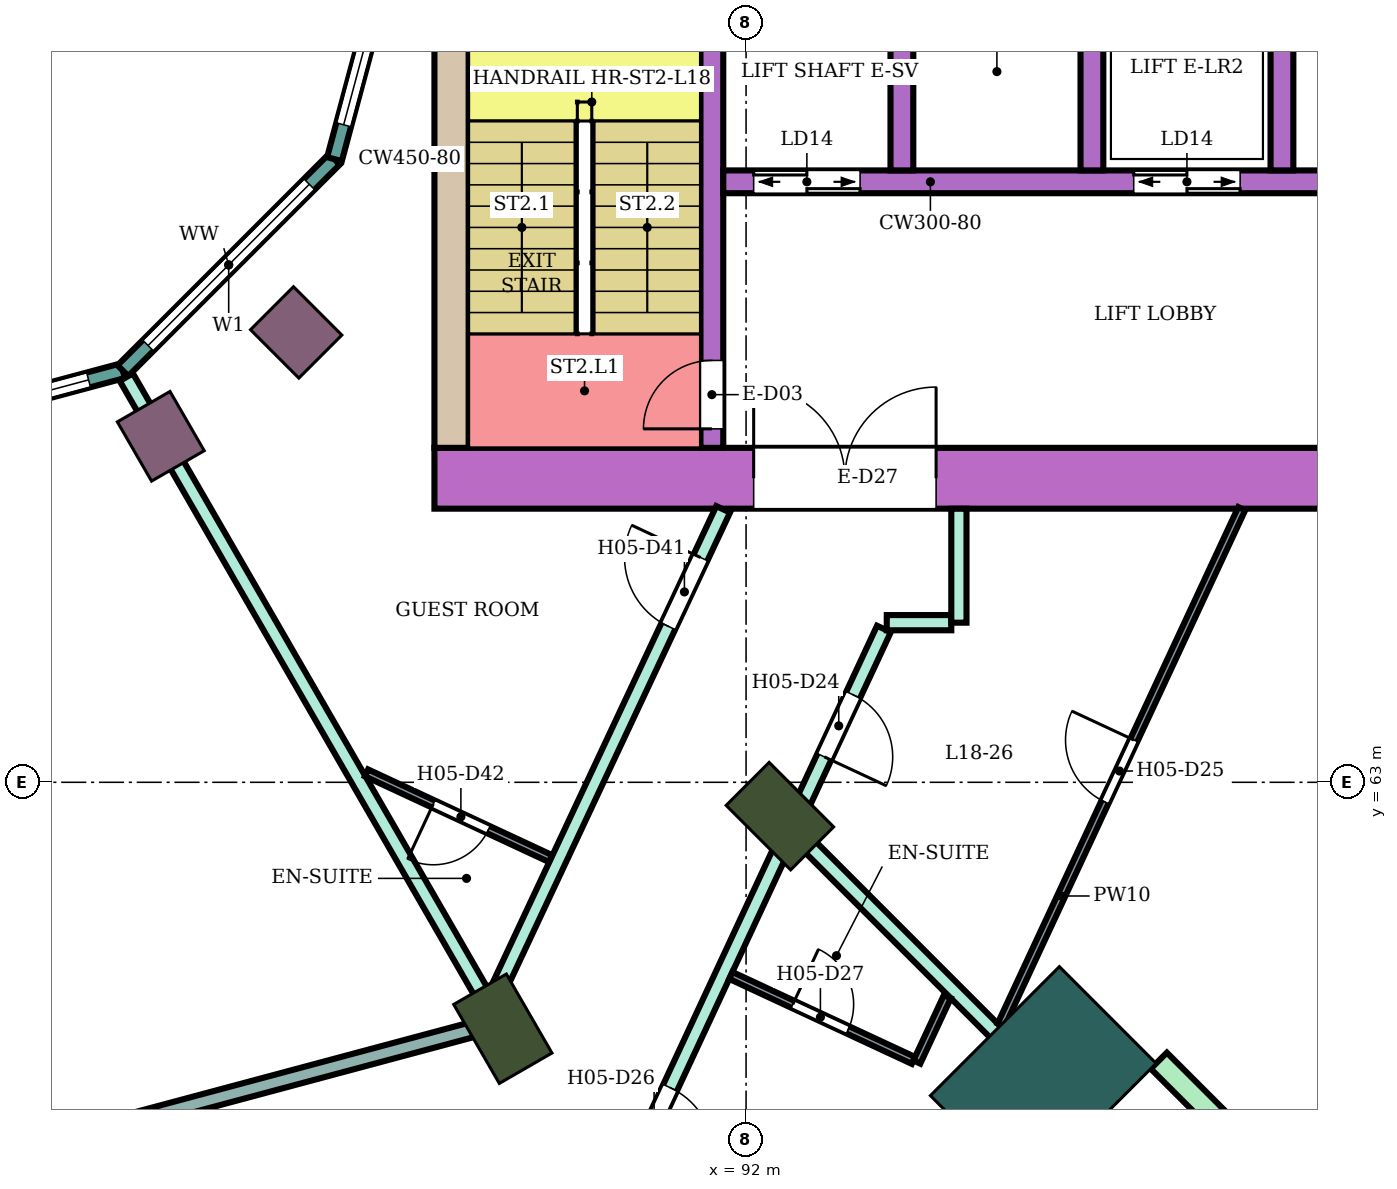
"""IFC4 building model, lengths in metres.
Left out: names, types, materials, properties, quantities, classifications, styles, units other than length and angle.
Written with IfcOpenShell. Run it as: python <this file> out.ifc"""

import sys

from ifc_helpers import new_model, si_unit, direction, frame, frame_2d, origin, origin_2d, place, context, subcontext, project, spatial, rectangle, extrude, element, fill, save


model = new_model("IFC4")
c1 = context("Model", 3, precision=1e-05, world=origin(), true_north=direction((0.0, 1.0)))
c2 = subcontext(c1, "Body", "Model", "MODEL_VIEW")
j1 = project(units=[si_unit("LENGTHUNIT", "METRE"), si_unit("PLANEANGLEUNIT", "RADIAN")], contexts=[c1])
p1 = place(None, origin())
s1 = spatial("IfcSite", under=j1, at=p1, CompositionType="ELEMENT")
p2 = place(p1, origin())
s2 = spatial("IfcBuilding", under=s1, at=p2, CompositionType="ELEMENT")
p3 = place(p2, frame((0.0, 0.0, 82.4)))
s3 = spatial("IfcBuildingStorey", under=s2, at=p3, CompositionType="ELEMENT", Elevation=82.4)
for number, where, z_axis, x_axis in (
    (1, (88.8, 59.758, 0.0), (0.0, 0.0, 1.0), (0.5, -0.866, 0.0)),
    (2, (92.445, 62.555, 0.0), (0.0, 0.0, 1.0), (0.707, -0.707, 0.0)),
):
    element("IfcColumn", number, at=place(p3, frame(where, z_axis=z_axis, x_axis=x_axis)), inside=s3, PredefinedType="COLUMN", context=c2, shape_type="SweptSolid", body=[
        extrude(rectangle(XDim=1.2, YDim=0.8, at=origin_2d()), origin(), (0.0, 0.0, 1.0), 3.8),
    ])
for number, where, z_axis, x_axis in (
    (3, (84.3, 67.552, 0.0), (0.0, 0.0, 1.0), (0.5, -0.866, 0.0)),
    (4, (86.081, 68.919, 0.0), (0.0, 0.0, 1.0), (0.707, -0.707, 0.0)),
):
    element("IfcColumn", number, at=place(p3, frame(where, z_axis=z_axis, x_axis=x_axis)), inside=s3, PredefinedType="COLUMN", context=c2, shape_type="SweptSolid", body=[
        extrude(rectangle(XDim=0.9, YDim=0.8, at=origin_2d()), origin(), (0.0, 0.0, 1.0), 3.8),
    ])
p4 = place(p3, frame((95.91, 59.09, 0.0), z_axis=(0.0, 0.0, 1.0), x_axis=(0.707106781187, -0.707106781187, 0.0)))
e5 = element("IfcColumn", 5, at=p4, inside=s3, PredefinedType="COLUMN", context=c2, shape_type="SweptSolid", body=[
    extrude(rectangle(XDim=1.8, YDim=2.4, at=origin_2d()), origin(), (0.0, 0.0, 1.0), 3.8),
])
p5 = place(p3, frame((87.9, 67.0, 0.0), z_axis=(0.0, 0.0, 1.0), x_axis=(1.0, 0.0, 0.0)))
e6 = element("IfcWall", 6, at=p5, inside=s3, PredefinedType="SHEAR", context=c2, shape_type="SweptSolid", body=[
    extrude(rectangle(XDim=14.7, YDim=0.8, at=frame_2d((7.35, 0.0))), origin(), (0.0, 0.0, 1.0), 3.48),
])
p6 = place(p5, frame((4.2, 0.0, 0.0)))
e7 = element("IfcOpeningElement", 7, at=p6, cuts=e6, PredefinedType="OPENING", context=c2, shape_type="SweptSolid", body=[
    extrude(rectangle(XDim=2.4, YDim=2.4, at=frame_2d((1.2, 1.2))), frame((0.0, 0.41, 0.0), z_axis=(0.0, -1.0, 0.0), x_axis=(1.0, 0.0, 0.0)), (0.0, 0.0, 1.0), 0.82),
])
p7 = place(p3, frame((88.125, 67.4, 0.0), z_axis=(0.0, 0.0, 1.0), x_axis=(0.0, 1.0, 0.0)))
e8 = element("IfcWall", 8, at=p7, inside=s3, PredefinedType="SHEAR", context=c2, shape_type="SweptSolid", body=[
    extrude(rectangle(XDim=7.6, YDim=0.45, at=frame_2d((3.8, 0.0))), origin(), (0.0, 0.0, 1.0), 3.48),
])
p8 = place(p3, frame((91.55, 67.4, 0.0), z_axis=(0.0, 0.0, 1.0), x_axis=(0.0, 1.0, 0.0)))
e9 = element("IfcWall", 9, at=p8, inside=s3, PredefinedType="SHEAR", context=c2, shape_type="SweptSolid", body=[
    extrude(rectangle(XDim=7.6, YDim=0.3, at=frame_2d((3.8, 0.0))), origin(), (0.0, 0.0, 1.0), 3.48),
])
p9 = place(p8, frame((0.25, 0.0, 0.0)))
e10 = element("IfcOpeningElement", 10, at=p9, cuts=e9, PredefinedType="OPENING", context=c2, shape_type="SweptSolid", body=[
    extrude(rectangle(XDim=0.9, YDim=2.1, at=frame_2d((0.45, 1.05))), frame((0.0, 0.16, 0.0), z_axis=(0.0, -1.0, 0.0), x_axis=(1.0, 0.0, 0.0)), (0.0, 0.0, 1.0), 0.32),
])
p10 = place(p3, frame((91.7, 70.9, 0.0), z_axis=(0.0, 0.0, 1.0), x_axis=(1.0, 0.0, 0.0)))
e11 = element("IfcWall", 11, at=p10, inside=s3, PredefinedType="SHEAR", context=c2, shape_type="SweptSolid", body=[
    extrude(rectangle(XDim=10.9, YDim=0.3, at=frame_2d((5.45, 0.0))), origin(), (0.0, 0.0, 1.0), 3.48),
])
p11 = place(p10, frame((0.4, 0.0, 0.0)))
e12 = element("IfcOpeningElement", 12, at=p11, cuts=e11, PredefinedType="OPENING", context=c2, shape_type="SweptSolid", body=[
    extrude(rectangle(XDim=1.4, YDim=2.1, at=frame_2d((0.7, 1.05))), frame((0.0, 0.16, 0.0), z_axis=(0.0, -1.0, 0.0), x_axis=(1.0, 0.0, 0.0)), (0.0, 0.0, 1.0), 0.32),
])
p12 = place(p10, frame((5.4, 0.0, 0.0)))
e13 = element("IfcOpeningElement", 13, at=p12, cuts=e11, PredefinedType="OPENING", context=c2, shape_type="SweptSolid", body=[
    extrude(rectangle(XDim=1.4, YDim=2.1, at=frame_2d((0.7, 1.05))), frame((0.0, 0.16, 0.0), z_axis=(0.0, -1.0, 0.0), x_axis=(1.0, 0.0, 0.0)), (0.0, 0.0, 1.0), 0.32),
])
p13 = place(p10, frame((8.1, 0.0, 0.0)))
e14 = element("IfcOpeningElement", 14, at=p13, cuts=e11, PredefinedType="OPENING", context=c2, shape_type="SweptSolid", body=[
    extrude(rectangle(XDim=1.0, YDim=2.1, at=frame_2d((0.5, 1.05))), frame((0.0, 0.16, 0.0), z_axis=(0.0, -1.0, 0.0), x_axis=(1.0, 0.0, 0.0)), (0.0, 0.0, 1.0), 0.32),
])
for number, where, z_axis, x_axis in (
    (15, (94.05, 71.05, 0.0), (0.0, 0.0, 1.0), (0.0, 1.0, 0.0)),
    (16, (96.55, 71.05, 0.0), (0.0, 0.0, 1.0), (0.0, 1.0, 0.0)),
    (17, (99.05, 71.05, 0.0), (0.0, 0.0, 1.0), (0.0, 1.0, 0.0)),
):
    element("IfcWall", number, at=place(p3, frame(where, z_axis=z_axis, x_axis=x_axis)), inside=s3, PredefinedType="SHEAR", context=c2, shape_type="SweptSolid", body=[
        extrude(rectangle(XDim=2.55, YDim=0.3, at=frame_2d((1.275, 0.0))), origin(), (0.0, 0.0, 1.0), 3.48),
    ])
p14 = place(p3, frame((97.43, 59.338, 0.0), z_axis=(0.0, 0.0, 1.0), x_axis=(0.707106781187, -0.707106781187, 0.0)))
e18 = element("IfcWall", 18, at=p14, inside=s3, PredefinedType="NOTDEFINED", context=c2, shape_type="SweptSolid", body=[
    extrude(rectangle(XDim=2.416, YDim=0.3, at=frame_2d((1.208, 0.0))), origin(), (0.0, 0.0, 1.0), 3.8),
])
p15 = place(p3, frame((80.0, 67.396, 0.0), z_axis=(0.0, 0.0, 1.0), x_axis=(0.965933654434, 0.258789828301, 0.0)))
e19 = element("IfcWall", 19, at=p15, inside=s3, PredefinedType="NOTDEFINED", context=c2, shape_type="SweptSolid", body=[
    extrude(rectangle(XDim=3.936, YDim=0.2, at=frame_2d((1.968, 0.0))), origin(), (0.0, 0.0, 1.0), 3.8),
])
p16 = place(p15, frame((0.468, 0.0, 0.9)))
e20 = element("IfcOpeningElement", 20, at=p16, cuts=e19, PredefinedType="OPENING", context=c2, shape_type="SweptSolid", body=[
    extrude(rectangle(XDim=3.0, YDim=2.3, at=frame_2d((1.5, 1.15))), frame((0.0, 0.11, 0.0), z_axis=(0.0, -1.0, 0.0), x_axis=(1.0, 0.0, 0.0)), (0.0, 0.0, 1.0), 0.22),
])
p17 = place(p3, frame((83.802, 68.415, 0.0), z_axis=(0.0, 0.0, 1.0), x_axis=(0.707106781187, 0.707106781187, 0.0)))
e21 = element("IfcWall", 21, at=p17, inside=s3, PredefinedType="NOTDEFINED", context=c2, shape_type="SweptSolid", body=[
    extrude(rectangle(XDim=3.936, YDim=0.2, at=frame_2d((1.968, 0.0))), origin(), (0.0, 0.0, 1.0), 3.8),
])
p18 = place(p17, frame((0.468, 0.0, 0.9)))
e22 = element("IfcOpeningElement", 22, at=p18, cuts=e21, PredefinedType="OPENING", context=c2, shape_type="SweptSolid", body=[
    extrude(rectangle(XDim=3.0, YDim=2.3, at=frame_2d((1.5, 1.15))), frame((0.0, 0.11, 0.0), z_axis=(0.0, -1.0, 0.0), x_axis=(1.0, 0.0, 0.0)), (0.0, 0.0, 1.0), 0.22),
])
p19 = place(p3, frame((86.585, 71.198, 0.0), z_axis=(0.0, 0.0, 1.0), x_axis=(0.258789828301, 0.965933654434, 0.0)))
e23 = element("IfcWall", 23, at=p19, inside=s3, PredefinedType="NOTDEFINED", context=c2, shape_type="SweptSolid", body=[
    extrude(rectangle(XDim=3.936, YDim=0.2, at=frame_2d((1.968, 0.0))), origin(), (0.0, 0.0, 1.0), 3.8),
])
p20 = place(p19, frame((0.468, 0.0, 0.9)))
e24 = element("IfcOpeningElement", 24, at=p20, cuts=e23, PredefinedType="OPENING", context=c2, shape_type="SweptSolid", body=[
    extrude(rectangle(XDim=3.0, YDim=2.3, at=frame_2d((1.5, 1.15))), frame((0.0, 0.11, 0.0), z_axis=(0.0, -1.0, 0.0), x_axis=(1.0, 0.0, 0.0)), (0.0, 0.0, 1.0), 0.22),
])
p21 = place(p3, frame((80.0, 57.496, 0.0), z_axis=(0.0, 0.0, 1.0), x_axis=(0.96592471314, 0.258823199396, 0.0)))
e25 = element("IfcWall", 25, at=p21, inside=s3, PredefinedType="PARTITIONING", context=c2, shape_type="SweptSolid", body=[
    extrude(rectangle(XDim=8.732, YDim=0.2, at=frame_2d((4.366, 0.0))), origin(), (0.0, 0.0, 1.0), 2.98),
])
p22 = place(p3, frame((83.846, 68.33, 0.0), z_axis=(0.0, 0.0, 1.0), x_axis=(0.499822319857, -0.866127963163, 0.0)))
e26 = element("IfcWall", 26, at=p22, inside=s3, PredefinedType="PARTITIONING", context=c2, shape_type="SweptSolid", body=[
    extrude(rectangle(XDim=9.382, YDim=0.2, at=frame_2d((4.691, 0.0))), origin(), (0.0, 0.0, 1.0), 3.35),
])
p23 = place(p3, frame((88.501, 59.775, 0.0), z_axis=(0.0, 0.0, 1.0), x_axis=(0.424700525505, 0.905333896215, 0.0)))
e27 = element("IfcWall", 27, at=p23, inside=s3, PredefinedType="PARTITIONING", context=c2, shape_type="SweptSolid", body=[
    extrude(rectangle(XDim=7.53, YDim=0.2, at=frame_2d((3.765, 0.0))), origin(), (0.0, 0.0, 1.0), 3.35),
])
p24 = place(p23, frame((5.83, 0.0, 0.0)))
e28 = element("IfcOpeningElement", 28, at=p24, cuts=e27, PredefinedType="OPENING", context=c2, shape_type="SweptSolid", body=[
    extrude(rectangle(XDim=1.0, YDim=2.1, at=frame_2d((0.5, 1.05))), frame((0.0, 0.11, 0.0), z_axis=(0.0, -1.0, 0.0), x_axis=(1.0, 0.0, 0.0)), (0.0, 0.0, 1.0), 0.22),
])
p25 = place(p3, frame((90.346, 57.578, 0.0), z_axis=(0.0, 0.0, 1.0), x_axis=(0.422403412327, 0.906407941964, 0.0)))
e29 = element("IfcWall", 29, at=p25, inside=s3, PredefinedType="PARTITIONING", context=c2, shape_type="SweptSolid", body=[
    extrude(rectangle(XDim=8.208, YDim=0.2, at=frame_2d((4.104, 0.0))), origin(), (0.0, 0.0, 1.0), 3.35),
])
p26 = place(p25, frame((6.351, 0.0, 0.0)))
e30 = element("IfcOpeningElement", 30, at=p26, cuts=e29, PredefinedType="OPENING", context=c2, shape_type="SweptSolid", body=[
    extrude(rectangle(XDim=0.9, YDim=2.1, at=frame_2d((0.45, 1.05))), frame((0.0, 0.11, 0.0), z_axis=(0.0, -1.0, 0.0), x_axis=(1.0, 0.0, 0.0)), (0.0, 0.0, 1.0), 0.22),
])
p27 = place(p25, frame((0.55, 0.0, 0.0)))
e31 = element("IfcOpeningElement", 31, at=p27, cuts=e29, PredefinedType="OPENING", context=c2, shape_type="SweptSolid", body=[
    extrude(rectangle(XDim=1.0, YDim=2.1, at=frame_2d((0.5, 1.05))), frame((0.0, 0.11, 0.0), z_axis=(0.0, -1.0, 0.0), x_axis=(1.0, 0.0, 0.0)), (0.0, 0.0, 1.0), 0.22),
])
p28 = place(p3, frame((92.692, 62.303, 0.0), z_axis=(0.0, 0.0, 1.0), x_axis=(0.706920663731, -0.707292849667, 0.0)))
e32 = element("IfcWall", 32, at=p28, inside=s3, PredefinedType="PARTITIONING", context=c2, shape_type="SweptSolid", body=[
    extrude(rectangle(XDim=5.248, YDim=0.2, at=frame_2d((2.624, 0.0))), origin(), (0.0, 0.0, 1.0), 3.35),
])
p29 = place(p3, frame((93.851, 65.1, 0.0), z_axis=(0.0, 0.0, 1.0), x_axis=(1.0, 0.0, 0.0)))
e33 = element("IfcWall", 33, at=p29, inside=s3, PredefinedType="PARTITIONING", context=c2, shape_type="SweptSolid", body=[
    extrude(rectangle(XDim=0.849, YDim=0.2, at=frame_2d((0.424, 0.0))), origin(), (0.0, 0.0, 1.0), 3.35),
])
p30 = place(p3, frame((94.8, 65.1, 0.0), z_axis=(0.0, 0.0, 1.0), x_axis=(0.0, 1.0, 0.0)))
e34 = element("IfcWall", 34, at=p30, inside=s3, PredefinedType="PARTITIONING", context=c2, shape_type="SweptSolid", body=[
    extrude(rectangle(XDim=1.499, YDim=0.2, at=frame_2d((0.75, 0.0))), origin(), (0.0, 0.0, 1.0), 3.35),
])
p31 = place(p3, frame((87.006, 63.124, 0.0), z_axis=(0.0, 0.0, 1.0), x_axis=(0.906535604863, -0.422129360642, 0.0)))
e35 = element("IfcWall", 35, at=p31, inside=s3, PredefinedType="PARTITIONING", context=c2, shape_type="SweptSolid", body=[
    extrude(rectangle(XDim=2.67, YDim=0.1, at=frame_2d((1.335, 0.0))), origin(), (0.0, 0.0, 1.0), 3.35),
])
p32 = place(p31, frame((0.97, 0.0, 0.0)))
e36 = element("IfcOpeningElement", 36, at=p32, cuts=e35, PredefinedType="OPENING", context=c2, shape_type="SweptSolid", body=[
    extrude(rectangle(XDim=0.8, YDim=2.1, at=frame_2d((0.4, 1.05))), frame((0.0, 0.06, 0.0), z_axis=(0.0, -1.0, 0.0), x_axis=(1.0, 0.0, 0.0)), (0.0, 0.0, 1.0), 0.12),
])
p33 = place(p3, frame((91.8, 60.459, 0.0), z_axis=(0.0, 0.0, 1.0), x_axis=(0.906644059932, -0.421896371861, 0.0)))
e37 = element("IfcWall", 37, at=p33, inside=s3, PredefinedType="PARTITIONING", context=c2, shape_type="SweptSolid", body=[
    extrude(rectangle(XDim=2.649, YDim=0.1, at=frame_2d((1.325, 0.0))), origin(), (0.0, 0.0, 1.0), 3.35),
])
p34 = place(p33, frame((0.899, 0.0, 0.0)))
e38 = element("IfcOpeningElement", 38, at=p34, cuts=e37, PredefinedType="OPENING", context=c2, shape_type="SweptSolid", body=[
    extrude(rectangle(XDim=0.8, YDim=2.1, at=frame_2d((0.4, 1.05))), frame((0.0, 0.06, 0.0), z_axis=(0.0, -1.0, 0.0), x_axis=(1.0, 0.0, 0.0)), (0.0, 0.0, 1.0), 0.12),
])
p35 = place(p3, frame((94.247, 59.32, 0.0), z_axis=(0.0, 0.0, 1.0), x_axis=(0.422660124657, 0.906288264861, 0.0)))
e39 = element("IfcWall", 39, at=p35, inside=s3, PredefinedType="PARTITIONING", context=c2, shape_type="SweptSolid", body=[
    extrude(rectangle(XDim=0.949, YDim=0.1, at=frame_2d((0.475, 0.0))), origin(), (0.0, 0.0, 1.0), 3.35),
])
p36 = place(p3, frame((95.355, 59.806, 0.0), z_axis=(0.0, 0.0, 1.0), x_axis=(0.422407546544, 0.906406015328, 0.0)))
e40 = element("IfcWall", 40, at=p36, inside=s3, PredefinedType="PARTITIONING", context=c2, shape_type="SweptSolid", body=[
    extrude(rectangle(XDim=7.496, YDim=0.1, at=frame_2d((3.748, 0.0))), origin(), (0.0, 0.0, 1.0), 3.35),
])
p37 = place(p36, frame((3.238, 0.0, 0.0)))
e41 = element("IfcOpeningElement", 41, at=p37, cuts=e40, PredefinedType="OPENING", context=c2, shape_type="SweptSolid", body=[
    extrude(rectangle(XDim=0.9, YDim=2.1, at=frame_2d((0.45, 1.05))), frame((0.0, 0.06, 0.0), z_axis=(0.0, -1.0, 0.0), x_axis=(1.0, 0.0, 0.0)), (0.0, 0.0, 1.0), 0.12),
])
p38 = place(p16, origin())
e42 = element("IfcWindow", 42, at=p38, inside=s3, PartitioningType="SINGLE_PANEL", PredefinedType="WINDOW", context=c2, shape_type="SweptSolid", body=[
    extrude(rectangle(XDim=3.0, YDim=2.3, at=frame_2d((1.5, 1.15))), frame((0.0, 0.03, 0.0), z_axis=(0.0, -1.0, 0.0), x_axis=(1.0, 0.0, 0.0)), (0.0, 0.0, 1.0), 0.06),
])
fill(e20, e42)
p39 = place(p18, origin())
e43 = element("IfcWindow", 43, at=p39, inside=s3, PartitioningType="SINGLE_PANEL", PredefinedType="WINDOW", context=c2, shape_type="SweptSolid", body=[
    extrude(rectangle(XDim=3.0, YDim=2.3, at=frame_2d((1.5, 1.15))), frame((0.0, 0.03, 0.0), z_axis=(0.0, -1.0, 0.0), x_axis=(1.0, 0.0, 0.0)), (0.0, 0.0, 1.0), 0.06),
])
fill(e22, e43)
p40 = place(p20, origin())
e44 = element("IfcWindow", 44, at=p40, inside=s3, PartitioningType="SINGLE_PANEL", PredefinedType="WINDOW", context=c2, shape_type="SweptSolid", body=[
    extrude(rectangle(XDim=3.0, YDim=2.3, at=frame_2d((1.5, 1.15))), frame((0.0, 0.03, 0.0), z_axis=(0.0, -1.0, 0.0), x_axis=(1.0, 0.0, 0.0)), (0.0, 0.0, 1.0), 0.06),
])
fill(e24, e44)
p41 = place(p26, frame((0.9, 0.0, 0.0), z_axis=(0.0, 0.0, 1.0), x_axis=(-1.0, 0.0, 0.0)))
e45 = element("IfcDoor", 45, at=p41, inside=s3, OperationType="SINGLE_SWING_RIGHT", PredefinedType="DOOR", context=c2, shape_type="SweptSolid", body=[
    extrude(rectangle(XDim=0.9, YDim=2.1, at=frame_2d((0.45, 1.05))), frame((0.0, 0.025, 0.0), z_axis=(0.0, -1.0, 0.0), x_axis=(1.0, 0.0, 0.0)), (0.0, 0.0, 1.0), 0.05),
])
fill(e30, e45)
p42 = place(p37, origin())
e46 = element("IfcDoor", 46, at=p42, inside=s3, OperationType="SINGLE_SWING_RIGHT", PredefinedType="DOOR", context=c2, shape_type="SweptSolid", body=[
    extrude(rectangle(XDim=0.9, YDim=2.1, at=frame_2d((0.45, 1.05))), frame((0.0, 0.025, 0.0), z_axis=(0.0, -1.0, 0.0), x_axis=(1.0, 0.0, 0.0)), (0.0, 0.0, 1.0), 0.05),
])
fill(e41, e46)
p43 = place(p27, frame((1.0, 0.0, 0.0), z_axis=(0.0, 0.0, 1.0), x_axis=(-1.0, 0.0, 0.0)))
e47 = element("IfcDoor", 47, at=p43, inside=s3, OperationType="SINGLE_SWING_RIGHT", PredefinedType="DOOR", context=c2, shape_type="SweptSolid", body=[
    extrude(rectangle(XDim=1.0, YDim=2.1, at=frame_2d((0.5, 1.05))), frame((0.0, 0.025, 0.0), z_axis=(0.0, -1.0, 0.0), x_axis=(1.0, 0.0, 0.0)), (0.0, 0.0, 1.0), 0.05),
])
fill(e31, e47)
p44 = place(p34, origin())
e48 = element("IfcDoor", 48, at=p44, inside=s3, OperationType="SINGLE_SWING_LEFT", PredefinedType="DOOR", context=c2, shape_type="SweptSolid", body=[
    extrude(rectangle(XDim=0.8, YDim=2.1, at=frame_2d((0.4, 1.05))), frame((0.0, 0.025, 0.0), z_axis=(0.0, -1.0, 0.0), x_axis=(1.0, 0.0, 0.0)), (0.0, 0.0, 1.0), 0.05),
])
fill(e38, e48)
p45 = place(p24, origin())
e49 = element("IfcDoor", 49, at=p45, inside=s3, OperationType="SINGLE_SWING_RIGHT", PredefinedType="DOOR", context=c2, shape_type="SweptSolid", body=[
    extrude(rectangle(XDim=1.0, YDim=2.1, at=frame_2d((0.5, 1.05))), frame((0.0, 0.025, 0.0), z_axis=(0.0, -1.0, 0.0), x_axis=(1.0, 0.0, 0.0)), (0.0, 0.0, 1.0), 0.05),
])
fill(e28, e49)
p46 = place(p32, frame((0.8, 0.0, 0.0), z_axis=(0.0, 0.0, 1.0), x_axis=(-1.0, 0.0, 0.0)))
e50 = element("IfcDoor", 50, at=p46, inside=s3, OperationType="SINGLE_SWING_RIGHT", PredefinedType="DOOR", context=c2, shape_type="SweptSolid", body=[
    extrude(rectangle(XDim=0.8, YDim=2.1, at=frame_2d((0.4, 1.05))), frame((0.0, 0.025, 0.0), z_axis=(0.0, -1.0, 0.0), x_axis=(1.0, 0.0, 0.0)), (0.0, 0.0, 1.0), 0.05),
])
fill(e36, e50)
p47 = place(p9, origin())
e51 = element("IfcDoor", 51, at=p47, inside=s3, OperationType="SINGLE_SWING_LEFT", PredefinedType="DOOR", context=c2, shape_type="SweptSolid", body=[
    extrude(rectangle(XDim=0.9, YDim=2.1, at=frame_2d((0.45, 1.05))), frame((0.0, 0.025, 0.0), z_axis=(0.0, -1.0, 0.0), x_axis=(1.0, 0.0, 0.0)), (0.0, 0.0, 1.0), 0.05),
])
fill(e10, e51)
p48 = place(p11, origin())
e52 = element("IfcDoor", 52, at=p48, inside=s3, OperationType="DOUBLE_DOOR_SLIDING", PredefinedType="DOOR", context=c2, shape_type="SweptSolid", body=[
    extrude(rectangle(XDim=1.4, YDim=2.1, at=frame_2d((0.7, 1.05))), frame((0.0, 0.025, 0.0), z_axis=(0.0, -1.0, 0.0), x_axis=(1.0, 0.0, 0.0)), (0.0, 0.0, 1.0), 0.05),
])
fill(e12, e52)
p49 = place(p12, origin())
e53 = element("IfcDoor", 53, at=p49, inside=s3, OperationType="DOUBLE_DOOR_SLIDING", PredefinedType="DOOR", context=c2, shape_type="SweptSolid", body=[
    extrude(rectangle(XDim=1.4, YDim=2.1, at=frame_2d((0.7, 1.05))), frame((0.0, 0.025, 0.0), z_axis=(0.0, -1.0, 0.0), x_axis=(1.0, 0.0, 0.0)), (0.0, 0.0, 1.0), 0.05),
])
fill(e13, e53)
p50 = place(p6, origin())
e54 = element("IfcDoor", 54, at=p50, inside=s3, OperationType="DOUBLE_DOOR_SINGLE_SWING", PredefinedType="DOOR", context=c2, shape_type="SweptSolid", body=[
    extrude(rectangle(XDim=2.4, YDim=2.4, at=frame_2d((1.2, 1.2))), frame((0.0, 0.025, 0.0), z_axis=(0.0, -1.0, 0.0), x_axis=(1.0, 0.0, 0.0)), (0.0, 0.0, 1.0), 0.05),
])
fill(e7, e54)
save(model, sys.argv[1])
